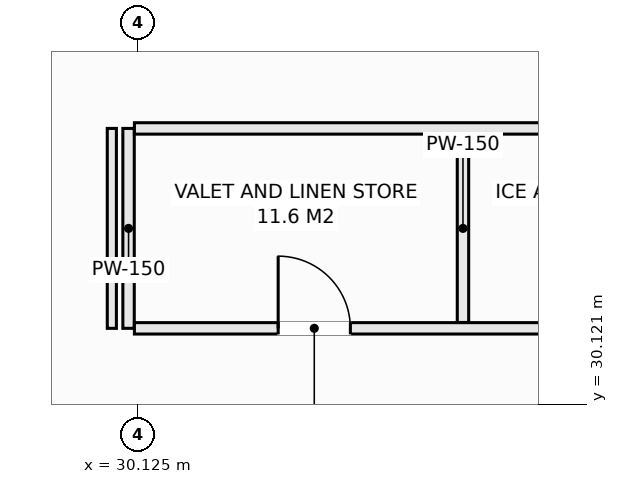
"""IFC4 building model, lengths in metres.
Left out: names, types, materials, properties, quantities, classifications, styles, units other than length and angle.
Written with IfcOpenShell. Run it as: python <this file> out.ifc"""

import sys

from ifc_helpers import new_model, si_unit, direction, frame, frame_2d, origin, place, context, subcontext, project, spatial, rectangle, extrude, element, fill, save


model = new_model("IFC4")
c1 = context("Model", 3, precision=1e-05, world=origin(), true_north=direction((0.0, 1.0)))
c2 = subcontext(c1, "Body", "Model", "MODEL_VIEW")
j1 = project(units=[si_unit("LENGTHUNIT", "METRE"), si_unit("PLANEANGLEUNIT", "RADIAN")], contexts=[c1])
p1 = place(None, origin())
s1 = spatial("IfcSite", under=j1, at=p1, CompositionType="ELEMENT")
p2 = place(p1, origin())
s2 = spatial("IfcBuilding", under=s1, at=p2, CompositionType="ELEMENT")
p3 = place(p2, frame((0.0, 0.0, 149.5)))
s3 = spatial("IfcBuildingStorey", under=s2, at=p3, CompositionType="ELEMENT", Elevation=149.5)
p4 = place(p3, frame((30.0, 31.12, 0.0), z_axis=(0.0, 0.0, 1.0), x_axis=(0.0, 1.0, 0.0)))
e1 = element("IfcWall", 1, at=p4, inside=s3, PredefinedType="PARTITIONING", context=c2, shape_type="SweptSolid", body=[
    extrude(rectangle(XDim=2.63, YDim=0.15, at=frame_2d((1.315, 0.0))), origin(), (0.0, 0.0, 1.0), 3.13),
])
p5 = place(p3, frame((30.077, 31.12, 0.0), z_axis=(0.0, 0.0, 1.0), x_axis=(1.0, 0.0, 0.0)))
e2 = element("IfcWall", 2, at=p5, inside=s3, PredefinedType="PARTITIONING", context=c2, shape_type="SweptSolid", body=[
    extrude(rectangle(XDim=8.661, YDim=0.15, at=frame_2d((4.331, 0.0))), origin(), (0.0, 0.0, 1.0), 3.13),
])
p6 = place(p5, frame((1.892, 0.0, 0.0)))
e3 = element("IfcOpeningElement", 3, at=p6, cuts=e2, PredefinedType="OPENING", context=c2, shape_type="SweptSolid", body=[
    extrude(rectangle(XDim=0.95, YDim=2.1, at=frame_2d((0.475, 1.05))), frame((0.0, 0.085, 0.0), z_axis=(0.0, -1.0, 0.0), x_axis=(1.0, 0.0, 0.0)), (0.0, 0.0, 1.0), 0.17),
])
p7 = place(p5, frame((5.812, 0.0, 0.0)))
e4 = element("IfcOpeningElement", 4, at=p7, cuts=e2, PredefinedType="OPENING", context=c2, shape_type="SweptSolid", body=[
    extrude(rectangle(XDim=0.95, YDim=2.1, at=frame_2d((0.475, 1.05))), frame((0.0, 0.085, 0.0), z_axis=(0.0, -1.0, 0.0), x_axis=(1.0, 0.0, 0.0)), (0.0, 0.0, 1.0), 0.17),
])
p8 = place(p3, frame((30.077, 33.75, 0.0), z_axis=(0.0, 0.0, 1.0), x_axis=(1.0, 0.0, 0.0)))
e5 = element("IfcWall", 5, at=p8, inside=s3, PredefinedType="PARTITIONING", context=c2, shape_type="SweptSolid", body=[
    extrude(rectangle(XDim=8.661, YDim=0.15, at=frame_2d((4.331, 0.0))), origin(), (0.0, 0.0, 1.0), 3.13),
])
p9 = place(p3, frame((34.4, 31.197, 0.0), z_axis=(0.0, 0.0, 1.0), x_axis=(0.0, 1.0, 0.0)))
e6 = element("IfcWall", 6, at=p9, inside=s3, PredefinedType="PARTITIONING", context=c2, shape_type="SweptSolid", body=[
    extrude(rectangle(XDim=2.476, YDim=0.15, at=frame_2d((1.238, 0.0))), origin(), (0.0, 0.0, 1.0), 3.13),
])
p10 = place(p3, frame((29.78, 31.12, 0.0), z_axis=(0.0, 0.0, 1.0), x_axis=(0.0, 1.0, 0.0)))
e7 = element("IfcWall", 7, at=p10, inside=s3, PredefinedType="PARTITIONING", context=c2, shape_type="SweptSolid", body=[
    extrude(rectangle(XDim=2.63, YDim=0.12, at=frame_2d((1.315, 0.0))), origin(), (0.0, 0.0, 1.0), 3.13),
])
p11 = place(p6, origin())
e8 = element("IfcDoor", 8, at=p11, inside=s3, OperationType="SINGLE_SWING_LEFT", PredefinedType="DOOR", context=c2, shape_type="SweptSolid", body=[
    extrude(rectangle(XDim=0.95, YDim=2.1, at=frame_2d((0.475, 1.05))), frame((0.0, 0.025, 0.0), z_axis=(0.0, -1.0, 0.0), x_axis=(1.0, 0.0, 0.0)), (0.0, 0.0, 1.0), 0.05),
])
fill(e3, e8)
save(model, sys.argv[1])
